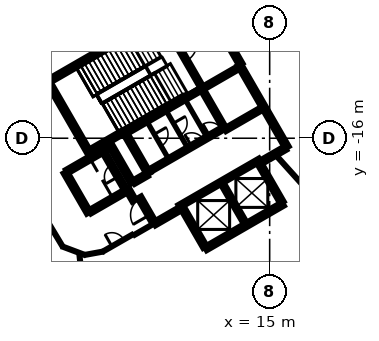
"""IFC4 building model, lengths in metres.
Left out: names, types, materials, properties, quantities, classifications, styles, units other than length and angle.
Written with IfcOpenShell. Run it as: python <this file> out.ifc"""

import sys

from ifc_helpers import new_model, si_unit, direction, frame, frame_2d, origin, place, context, subcontext, project, spatial, rectangle, extrude, element, fill, save


model = new_model("IFC4")
c1 = context("Model", 3, precision=1e-05, world=origin(), true_north=direction((0.0, 1.0)))
c2 = subcontext(c1, "Body", "Model", "MODEL_VIEW")
j1 = project(units=[si_unit("LENGTHUNIT", "METRE"), si_unit("PLANEANGLEUNIT", "RADIAN")], contexts=[c1])
p1 = place(None, origin())
s1 = spatial("IfcSite", under=j1, at=p1, CompositionType="ELEMENT")
p2 = place(p1, origin())
s2 = spatial("IfcBuilding", under=s1, at=p2, CompositionType="ELEMENT")
p3 = place(p2, origin())
s3 = spatial("IfcBuildingStorey", under=s2, at=p3, CompositionType="ELEMENT", Elevation=0.0)
p4 = place(p3, frame((0.417, -12.273, 0.0), z_axis=(0.0, 0.0, 1.0), x_axis=(0.866021906294, 0.500006057782, 0.0)))
e1 = element("IfcWall", 1, at=p4, inside=s3, PredefinedType="SHEAR", context=c2, shape_type="SweptSolid", body=[
    extrude(rectangle(XDim=11.55, YDim=0.25, at=frame_2d((5.775, 0.0))), origin(), (0.0, 0.0, 1.0), 7.1),
])
p5 = place(p4, frame((10.025, 0.0, 0.0)))
e2 = element("IfcOpeningElement", 2, at=p5, cuts=e1, PredefinedType="OPENING", context=c2, shape_type="SweptSolid", body=[
    extrude(rectangle(XDim=1.2, YDim=2.1, at=frame_2d((0.6, 1.05))), frame((0.0, 0.135, 0.0), z_axis=(0.0, -1.0, 0.0), x_axis=(1.0, 0.0, 0.0)), (0.0, 0.0, 1.0), 0.27),
])
p6 = place(p4, frame((8.725, 0.0, 0.0)))
e3 = element("IfcOpeningElement", 3, at=p6, cuts=e1, PredefinedType="OPENING", context=c2, shape_type="SweptSolid", body=[
    extrude(rectangle(XDim=1.2, YDim=2.1, at=frame_2d((0.6, 1.05))), frame((0.0, 0.135, 0.0), z_axis=(0.0, -1.0, 0.0), x_axis=(1.0, 0.0, 0.0)), (0.0, 0.0, 1.0), 0.27),
])
p7 = place(p3, frame((13.008, -11.181, 0.0), z_axis=(0.0, 0.0, 1.0), x_axis=(0.500004234368, -0.866022959057, 0.0)))
e4 = element("IfcWall", 4, at=p7, inside=s3, PredefinedType="SHEAR", context=c2, shape_type="SweptSolid", body=[
    extrude(rectangle(XDim=6.25, YDim=0.25, at=frame_2d((3.125, 0.0))), origin(), (0.0, 0.0, 1.0), 7.1),
])
p8 = place(p3, frame((15.865, -20.328, 0.0), z_axis=(0.0, 0.0, 1.0), x_axis=(-0.86602852612, -0.499994591916, 0.0)))
e5 = element("IfcWall", 5, at=p8, inside=s3, PredefinedType="SHEAR", context=c2, shape_type="SweptSolid", body=[
    extrude(rectangle(XDim=5.85, YDim=0.25, at=frame_2d((2.925, 0.0))), origin(), (0.0, 0.0, 1.0), 7.1),
])
p9 = place(p3, frame((3.235, -17.153, 0.0), z_axis=(0.0, 0.0, 1.0), x_axis=(-0.500008851346, 0.866020293397, 0.0)))
e6 = element("IfcWall", 6, at=p9, inside=s3, PredefinedType="SHEAR", context=c2, shape_type="SweptSolid", body=[
    extrude(rectangle(XDim=5.51, YDim=0.25, at=frame_2d((2.755, 0.0))), origin(), (0.0, 0.0, 1.0), 7.1),
])
p10 = place(p3, frame((10.483, -6.606, 0.0), z_axis=(0.0, 0.0, 1.0), x_axis=(0.49999885962, -0.866026062182, 0.0)))
e7 = element("IfcWall", 7, at=p10, inside=s3, PredefinedType="SHEAR", context=c2, shape_type="SweptSolid", body=[
    extrude(rectangle(XDim=5.225, YDim=0.25, at=frame_2d((2.612, 0.0))), origin(), (0.0, 0.0, 1.0), 7.1),
])
p11 = place(p3, frame((7.031, -18.327, 0.0), z_axis=(0.0, 0.0, 1.0), x_axis=(-0.499971222258, 0.866042017984, 0.0)))
e8 = element("IfcWall", 8, at=p11, inside=s3, PredefinedType="SHEAR", context=c2, shape_type="SweptSolid", body=[
    extrude(rectangle(XDim=3.2, YDim=0.25, at=frame_2d((1.6, 0.0))), origin(), (0.0, 0.0, 1.0), 7.1),
])
for number, where, z_axis, x_axis in (
    (9, (14.315, -17.644, 0.0), (0.0, 0.0, 1.0), (0.5, -0.866, 0.0)),
    (10, (10.736, -23.145, 0.0), (0.0, 0.0, 1.0), (-0.5, 0.866, 0.0)),
):
    element("IfcWall", number, at=place(p3, frame(where, z_axis=z_axis, x_axis=x_axis)), inside=s3, PredefinedType="SHEAR", context=c2, shape_type="SweptSolid", body=[
        extrude(rectangle(XDim=2.974, YDim=0.25, at=frame_2d((1.487, 0.0))), origin(), (0.0, 0.0, 1.0), 7.1),
    ])
p12 = place(p3, frame((3.085, -20.894, 0.0), z_axis=(0.0, 0.0, 1.0), x_axis=(-0.499978833458, 0.866037623948, 0.0)))
e11 = element("IfcWall", 11, at=p12, inside=s3, PredefinedType="SHEAR", context=c2, shape_type="SweptSolid", body=[
    extrude(rectangle(XDim=3.05, YDim=0.25, at=frame_2d((1.525, 0.0))), origin(), (0.0, 0.0, 1.0), 7.1),
])
p13 = place(p3, frame((1.669, -18.19, 0.0), z_axis=(0.0, 0.0, 1.0), x_axis=(0.866042235819, 0.499970844928, 0.0)))
e12 = element("IfcWall", 12, at=p13, inside=s3, PredefinedType="SHEAR", context=c2, shape_type="SweptSolid", body=[
    extrude(rectangle(XDim=2.865, YDim=0.25, at=frame_2d((1.432, 0.0))), origin(), (0.0, 0.0, 1.0), 7.1),
])
p14 = place(p3, frame((5.675, -19.399, 0.0), z_axis=(0.0, 0.0, 1.0), x_axis=(-0.866026637627, -0.499997862916, 0.0)))
e13 = element("IfcWall", 13, at=p14, inside=s3, PredefinedType="SHEAR", context=c2, shape_type="SweptSolid", body=[
    extrude(rectangle(XDim=2.865, YDim=0.25, at=frame_2d((1.432, 0.0))), origin(), (0.0, 0.0, 1.0), 7.1),
])
p15 = place(p3, frame((4.414, -16.276, 0.0), z_axis=(0.0, 0.0, 1.0), x_axis=(0.500003324108, -0.866023484601, 0.0)))
e14 = element("IfcWall", 14, at=p15, inside=s3, PredefinedType="SHEAR", context=c2, shape_type="SweptSolid", body=[
    extrude(rectangle(XDim=3.085, YDim=0.25, at=frame_2d((1.542, 0.0))), origin(), (0.0, 0.0, 1.0), 7.1),
])
p16 = place(p3, frame((5.322, -15.619, 0.0), z_axis=(0.0, 0.0, 1.0), x_axis=(-0.866026229868, -0.499998569178, 0.0)))
e15 = element("IfcWall", 15, at=p16, inside=s3, PredefinedType="SHEAR", context=c2, shape_type="SweptSolid", body=[
    extrude(rectangle(XDim=2.449, YDim=0.25, at=frame_2d((1.225, 0.0))), origin(), (0.0, 0.0, 1.0), 7.1),
])
p17 = place(p3, frame((9.14, -20.631, 0.0), z_axis=(0.0, 0.0, 1.0), x_axis=(-0.866043531843, -0.499968599967, 0.0)))
e16 = element("IfcWall", 16, at=p17, inside=s3, PredefinedType="SHEAR", context=c2, shape_type="SweptSolid", body=[
    extrude(rectangle(XDim=1.975, YDim=0.25, at=frame_2d((0.987, 0.0))), origin(), (0.0, 0.0, 1.0), 7.1),
])
p18 = place(p3, frame((16.025, -16.656, 0.0), z_axis=(0.0, 0.0, 1.0), x_axis=(-0.866016279763, -0.500015802937, 0.0)))
e17 = element("IfcWall", 17, at=p18, inside=s3, PredefinedType="SHEAR", context=c2, shape_type="SweptSolid", body=[
    extrude(rectangle(XDim=1.849, YDim=0.25, at=frame_2d((0.925, 0.0))), origin(), (0.0, 0.0, 1.0), 7.1),
])
p19 = place(p3, frame((7.367, -21.51, 0.0), z_axis=(0.0, 0.0, 1.0), x_axis=(-0.499983108224, 0.866035156036, 0.0)))
e18 = element("IfcWall", 18, at=p19, inside=s3, PredefinedType="SHEAR", context=c2, shape_type="SweptSolid", body=[
    extrude(rectangle(XDim=1.865, YDim=0.25, at=frame_2d((0.932, 0.0))), origin(), (0.0, 0.0, 1.0), 7.1),
])
p20 = place(p19, frame((0.535, 0.0, 0.0)))
e19 = element("IfcOpeningElement", 19, at=p20, cuts=e18, PredefinedType="OPENING", context=c2, shape_type="SweptSolid", body=[
    extrude(rectangle(XDim=1.25, YDim=2.1, at=frame_2d((0.625, 1.05))), frame((0.0, 0.135, 0.0), z_axis=(0.0, -1.0, 0.0), x_axis=(1.0, 0.0, 0.0)), (0.0, 0.0, 1.0), 0.27),
])
p21 = place(p3, frame((6.065, -18.885, 0.0), z_axis=(0.0, 0.0, 1.0), x_axis=(0.866017078145, 0.500014420154, 0.0)))
e20 = element("IfcWall", 20, at=p21, inside=s3, PredefinedType="SHEAR", context=c2, shape_type="SweptSolid", body=[
    extrude(rectangle(XDim=0.989, YDim=0.25, at=frame_2d((0.495, 0.0))), origin(), (0.0, 0.0, 1.0), 7.1),
])
p22 = place(p3, frame((6.08, -20.1, 0.0), z_axis=(0.0, 0.0, 1.0), x_axis=(-0.500051773299, 0.865995510393, 0.0)))
e21 = element("IfcWall", 21, at=p22, inside=s3, PredefinedType="SHEAR", context=c2, shape_type="SweptSolid", body=[
    extrude(rectangle(XDim=0.685, YDim=0.25, at=frame_2d((0.342, 0.0))), origin(), (0.0, 0.0, 1.0), 7.1),
])
p23 = place(p3, frame((4.145, -16.749, 0.0), z_axis=(0.0, 0.0, 1.0), x_axis=(0.866185586049, 0.49972245349, 0.0)))
e22 = element("IfcWall", 22, at=p23, inside=s3, PredefinedType="SHEAR", context=c2, shape_type="SweptSolid", body=[
    extrude(rectangle(XDim=0.344, YDim=0.25, at=frame_2d((0.172, 0.0))), origin(), (0.0, 0.0, 1.0), 7.1),
])
p24 = place(p3, frame((9.052, -20.48, 0.0), z_axis=(0.0, 0.0, 1.0), x_axis=(0.866030299012, 0.499991521122, 0.0)))
e23 = element("IfcWall", 23, at=p24, inside=s3, PredefinedType="SHEAR", context=c2, shape_type="SweptSolid", body=[
    extrude(rectangle(XDim=6.1, YDim=0.2, at=frame_2d((3.05, 0.0))), origin(), (0.0, 0.0, 1.0), 7.1),
])
p25 = place(p24, frame((1.0, 0.0, 0.0)))
e24 = element("IfcOpeningElement", 24, at=p25, cuts=e23, PredefinedType="OPENING", context=c2, shape_type="SweptSolid", body=[
    extrude(rectangle(XDim=1.2, YDim=2.1, at=frame_2d((0.6, 1.05))), frame((0.0, 0.11, 0.0), z_axis=(0.0, -1.0, 0.0), x_axis=(1.0, 0.0, 0.0)), (0.0, 0.0, 1.0), 0.22),
])
p26 = place(p24, frame((4.05, 0.0, 0.0)))
e25 = element("IfcOpeningElement", 25, at=p26, cuts=e23, PredefinedType="OPENING", context=c2, shape_type="SweptSolid", body=[
    extrude(rectangle(XDim=1.2, YDim=2.1, at=frame_2d((0.6, 1.05))), frame((0.0, 0.11, 0.0), z_axis=(0.0, -1.0, 0.0), x_axis=(1.0, 0.0, 0.0)), (0.0, 0.0, 1.0), 0.22),
])
p27 = place(p3, frame((10.538, -12.752, 0.0), z_axis=(0.0, 0.0, 1.0), x_axis=(-0.866038630372, -0.499977090179, 0.0)))
e26 = element("IfcWall", 26, at=p27, inside=s3, PredefinedType="SHEAR", context=c2, shape_type="SweptSolid", body=[
    extrude(rectangle(XDim=5.699, YDim=0.2, at=frame_2d((2.85, 0.0))), origin(), (0.0, 0.0, 1.0), 7.1),
])
p28 = place(p3, frame((7.077, -18.156, 0.0), z_axis=(0.0, 0.0, 1.0), x_axis=(0.866038630372, 0.499977090179, 0.0)))
e27 = element("IfcWall", 27, at=p28, inside=s3, PredefinedType="SHEAR", context=c2, shape_type="SweptSolid", body=[
    extrude(rectangle(XDim=5.699, YDim=0.2, at=frame_2d((2.85, 0.0))), origin(), (0.0, 0.0, 1.0), 7.1),
])
p29 = place(p28, frame((3.224, 0.0, 0.0)))
e28 = element("IfcOpeningElement", 28, at=p29, cuts=e27, PredefinedType="OPENING", context=c2, shape_type="SweptSolid", body=[
    extrude(rectangle(XDim=0.9, YDim=2.1, at=frame_2d((0.45, 1.05))), frame((0.0, 0.11, 0.0), z_axis=(0.0, -1.0, 0.0), x_axis=(1.0, 0.0, 0.0)), (0.0, 0.0, 1.0), 0.22),
])
p30 = place(p28, frame((4.599, 0.0, 0.0)))
e29 = element("IfcOpeningElement", 29, at=p30, cuts=e27, PredefinedType="OPENING", context=c2, shape_type="SweptSolid", body=[
    extrude(rectangle(XDim=0.9, YDim=2.1, at=frame_2d((0.45, 1.05))), frame((0.0, 0.11, 0.0), z_axis=(0.0, -1.0, 0.0), x_axis=(1.0, 0.0, 0.0)), (0.0, 0.0, 1.0), 0.22),
])
p31 = place(p3, frame((7.906, -8.094, 0.0), z_axis=(0.0, 0.0, 1.0), x_axis=(0.500024287448, -0.866011380966, 0.0)))
e30 = element("IfcWall", 30, at=p31, inside=s3, PredefinedType="SHEAR", context=c2, shape_type="SweptSolid", body=[
    extrude(rectangle(XDim=5.251, YDim=0.2, at=frame_2d((2.625, 0.0))), origin(), (0.0, 0.0, 1.0), 7.1),
])
p32 = place(p31, frame((1.849, 0.0, 0.0)))
e31 = element("IfcOpeningElement", 31, at=p32, cuts=e30, PredefinedType="OPENING", context=c2, shape_type="SweptSolid", body=[
    extrude(rectangle(XDim=1.4, YDim=2.1, at=frame_2d((0.7, 1.05))), frame((0.0, 0.11, 0.0), z_axis=(0.0, -1.0, 0.0), x_axis=(1.0, 0.0, 0.0)), (0.0, 0.0, 1.0), 0.22),
])
p33 = place(p3, frame((11.875, -18.967, 0.0), z_axis=(0.0, 0.0, 1.0), x_axis=(0.49998131003, -0.866036194175, 0.0)))
e32 = element("IfcWall", 32, at=p33, inside=s3, PredefinedType="SHEAR", context=c2, shape_type="SweptSolid", body=[
    extrude(rectangle(XDim=3.048, YDim=0.2, at=frame_2d((1.524, 0.0))), origin(), (0.0, 0.0, 1.0), 7.1),
])
p34 = place(p3, frame((5.503, -19.352, 0.0), z_axis=(0.0, 0.0, 1.0), x_axis=(-0.499986818241, 0.866033014143, 0.0)))
e33 = element("IfcWall", 33, at=p34, inside=s3, PredefinedType="SHEAR", context=c2, shape_type="SweptSolid", body=[
    extrude(rectangle(XDim=2.798, YDim=0.2, at=frame_2d((1.399, 0.0))), origin(), (0.0, 0.0, 1.0), 7.1),
])
p35 = place(p34, frame((0.949, 0.0, 0.0)))
e34 = element("IfcOpeningElement", 34, at=p35, cuts=e33, PredefinedType="OPENING", context=c2, shape_type="SweptSolid", body=[
    extrude(rectangle(XDim=0.9, YDim=2.1, at=frame_2d((0.45, 1.05))), frame((0.0, 0.11, 0.0), z_axis=(0.0, -1.0, 0.0), x_axis=(1.0, 0.0, 0.0)), (0.0, 0.0, 1.0), 0.22),
])
p36 = place(p3, frame((11.963, -15.22, 0.0), z_axis=(0.0, 0.0, 1.0), x_axis=(-0.500034990121, 0.866005201286, 0.0)))
e35 = element("IfcWall", 35, at=p36, inside=s3, PredefinedType="SHEAR", context=c2, shape_type="SweptSolid", body=[
    extrude(rectangle(XDim=2.75, YDim=0.2, at=frame_2d((1.375, 0.0))), origin(), (0.0, 0.0, 1.0), 7.1),
])
p37 = place(p3, frame((10.587, -12.723, 0.0), z_axis=(0.0, 0.0, 1.0), x_axis=(0.866037306777, 0.499979382845, 0.0)))
e36 = element("IfcWall", 36, at=p37, inside=s3, PredefinedType="SHEAR", context=c2, shape_type="SweptSolid", body=[
    extrude(rectangle(XDim=2.742, YDim=0.2, at=frame_2d((1.371, 0.0))), origin(), (0.0, 0.0, 1.0), 7.1),
])
p38 = place(p37, frame((0.743, 0.0, 0.0)))
e37 = element("IfcOpeningElement", 37, at=p38, cuts=e36, PredefinedType="OPENING", context=c2, shape_type="SweptSolid", body=[
    extrude(rectangle(XDim=1.3, YDim=2.1, at=frame_2d((0.65, 1.05))), frame((0.0, 0.11, 0.0), z_axis=(0.0, -1.0, 0.0), x_axis=(1.0, 0.0, 0.0)), (0.0, 0.0, 1.0), 0.22),
])
p39 = place(p3, frame((14.512, -14.037, 0.0), z_axis=(0.0, 0.0, 1.0), x_axis=(-0.866044696403, -0.499966582715, 0.0)))
e38 = element("IfcWall", 38, at=p39, inside=s3, PredefinedType="SHEAR", context=c2, shape_type="SweptSolid", body=[
    extrude(rectangle(XDim=2.799, YDim=0.2, at=frame_2d((1.399, 0.0))), origin(), (0.0, 0.0, 1.0), 7.1),
])
p40 = place(p3, frame((8.207, -14.214, 0.0), z_axis=(0.0, 0.0, 1.0), x_axis=(0.50002746344, -0.86600954718, 0.0)))
e39 = element("IfcWall", 39, at=p40, inside=s3, PredefinedType="PARTITIONING", context=c2, shape_type="SweptSolid", body=[
    extrude(rectangle(XDim=2.748, YDim=0.15, at=frame_2d((1.374, 0.0))), origin(), (0.0, 0.0, 1.0), 7.1),
])
p41 = place(p40, frame((0.924, 0.0, 0.0)))
e40 = element("IfcOpeningElement", 40, at=p41, cuts=e39, PredefinedType="OPENING", context=c2, shape_type="SweptSolid", body=[
    extrude(rectangle(XDim=0.9, YDim=2.1, at=frame_2d((0.45, 1.05))), frame((0.0, 0.085, 0.0), z_axis=(0.0, -1.0, 0.0), x_axis=(1.0, 0.0, 0.0)), (0.0, 0.0, 1.0), 0.17),
])
p42 = place(p3, frame((9.462, -13.489, 0.0), z_axis=(0.0, 0.0, 1.0), x_axis=(0.499988999718, -0.866031754707, 0.0)))
e41 = element("IfcWall", 41, at=p42, inside=s3, PredefinedType="PARTITIONING", context=c2, shape_type="SweptSolid", body=[
    extrude(rectangle(XDim=2.749, YDim=0.15, at=frame_2d((1.374, 0.0))), origin(), (0.0, 0.0, 1.0), 7.1),
])
p43 = place(p3, frame((6.951, -14.939, 0.0), z_axis=(0.0, 0.0, 1.0), x_axis=(0.499988999718, -0.866031754707, 0.0)))
e42 = element("IfcWall", 42, at=p43, inside=s3, PredefinedType="PARTITIONING", context=c2, shape_type="SweptSolid", body=[
    extrude(rectangle(XDim=2.749, YDim=0.15, at=frame_2d((1.374, 0.0))), origin(), (0.0, 0.0, 1.0), 7.1),
])
p44 = place(p43, frame((0.924, 0.0, 0.0)))
e43 = element("IfcOpeningElement", 43, at=p44, cuts=e42, PredefinedType="OPENING", context=c2, shape_type="SweptSolid", body=[
    extrude(rectangle(XDim=0.9, YDim=2.1, at=frame_2d((0.45, 1.05))), frame((0.0, 0.085, 0.0), z_axis=(0.0, -1.0, 0.0), x_axis=(1.0, 0.0, 0.0)), (0.0, 0.0, 1.0), 0.17),
])
p45 = place(p3, frame((10.617, -6.426, 0.0), z_axis=(0.0, 0.0, 1.0), x_axis=(0.957017605076, -0.290029832216, 0.0)))
e44 = element("IfcWall", 44, at=p45, inside=s3, PredefinedType="PARTITIONING", context=c2, shape_type="SweptSolid", body=[
    extrude(rectangle(XDim=15.402, YDim=0.2, at=frame_2d((7.701, 0.0))), origin(), (0.0, 0.0, 1.0), 4.7),
])
p46 = place(p3, frame((-1.046, -19.087, 0.0), z_axis=(0.0, 0.0, 1.0), x_axis=(0.515112605672, -0.857122513692, 0.0)))
e45 = element("IfcWall", 45, at=p46, inside=s3, PredefinedType="PARTITIONING", context=c2, shape_type="SweptSolid", body=[
    extrude(rectangle(XDim=4.713, YDim=0.2, at=frame_2d((2.357, 0.0))), origin(), (0.0, 0.0, 1.0), 7.1),
])
p47 = place(p3, frame((1.391, -23.133, 0.0), z_axis=(0.0, 0.0, 1.0), x_axis=(0.936212023637, -0.351435693688, 0.0)))
e46 = element("IfcWall", 46, at=p47, inside=s3, PredefinedType="PARTITIONING", context=c2, shape_type="SweptSolid", body=[
    extrude(rectangle(XDim=1.542, YDim=0.2, at=frame_2d((0.771, 0.0))), origin(), (0.0, 0.0, 1.0), 7.1),
])
p48 = place(p3, frame((2.474, -23.543, 0.0), z_axis=(0.0, 0.0, 1.0), x_axis=(0.10461532009, -0.994512762514, 0.0)))
e47 = element("IfcWall", 47, at=p48, inside=s3, PredefinedType="PARTITIONING", context=c2, shape_type="SweptSolid", body=[
    extrude(rectangle(XDim=9.697, YDim=0.2, at=frame_2d((4.848, 0.0))), origin(), (0.0, 0.0, 1.0), 4.7),
])
p49 = place(p3, frame((2.838, -23.675, 0.0), z_axis=(0.0, 0.0, 1.0), x_axis=(0.983748481543, 0.179552012136, 0.0)))
e48 = element("IfcWall", 48, at=p49, inside=s3, PredefinedType="PARTITIONING", context=c2, shape_type="SweptSolid", body=[
    extrude(rectangle(XDim=1.192, YDim=0.2, at=frame_2d((0.596, 0.0))), origin(), (0.0, 0.0, 1.0), 7.1),
])
p50 = place(p3, frame((4.022, -23.458, 0.0), z_axis=(0.0, 0.0, 1.0), x_axis=(0.867379634497, 0.497647033208, 0.0)))
e49 = element("IfcWall", 49, at=p50, inside=s3, PredefinedType="PARTITIONING", context=c2, shape_type="SweptSolid", body=[
    extrude(rectangle(XDim=2.283, YDim=0.2, at=frame_2d((1.141, 0.0))), origin(), (0.0, 0.0, 1.0), 7.1),
])
p51 = place(p50, frame((0.691, 0.0, 0.0)))
e50 = element("IfcOpeningElement", 50, at=p51, cuts=e49, PredefinedType="OPENING", context=c2, shape_type="SweptSolid", body=[
    extrude(rectangle(XDim=0.9, YDim=2.1, at=frame_2d((0.45, 1.05))), frame((0.0, 0.11, 0.0), z_axis=(0.0, -1.0, 0.0), x_axis=(1.0, 0.0, 0.0)), (0.0, 0.0, 1.0), 0.22),
])
p52 = place(p3, frame((6.059, -22.383, 0.0), z_axis=(0.0, 0.0, 1.0), x_axis=(0.866009351323, 0.500027802648, 0.0)))
e51 = element("IfcWall", 51, at=p52, inside=s3, PredefinedType="PARTITIONING", context=c2, shape_type="SweptSolid", body=[
    extrude(rectangle(XDim=1.384, YDim=0.2, at=frame_2d((0.692, 0.0))), origin(), (0.0, 0.0, 1.0), 7.1),
])
p53 = place(p3, frame((15.475, -17.188, 0.0), z_axis=(0.0, 0.0, 1.0), x_axis=(0.669166821611, -0.74311221552, 0.0)))
e52 = element("IfcWall", 52, at=p53, inside=s3, PredefinedType="PARTITIONING", context=c2, shape_type="SweptSolid", body=[
    extrude(rectangle(XDim=17.218, YDim=0.2, at=frame_2d((8.609, 0.0))), origin(), (0.0, 0.0, 1.0), 4.7),
])
p54 = place(p53, frame((8.006, 0.0, 0.0)))
e53 = element("IfcOpeningElement", 53, at=p54, cuts=e52, PredefinedType="OPENING", context=c2, shape_type="SweptSolid", body=[
    extrude(rectangle(XDim=1.0, YDim=2.1, at=frame_2d((0.5, 1.05))), frame((0.0, 0.11, 0.0), z_axis=(0.0, -1.0, 0.0), x_axis=(1.0, 0.0, 0.0)), (0.0, 0.0, 1.0), 0.22),
])
p55 = place(p38, origin())
e54 = element("IfcDoor", 54, at=p55, inside=s3, OperationType="SLIDING_TO_RIGHT", PredefinedType="DOOR", context=c2, shape_type="SweptSolid", body=[
    extrude(rectangle(XDim=1.3, YDim=2.1, at=frame_2d((0.65, 1.05))), frame((0.0, 0.025, 0.0), z_axis=(0.0, -1.0, 0.0), x_axis=(1.0, 0.0, 0.0)), (0.0, 0.0, 1.0), 0.05),
])
fill(e37, e54)
p56 = place(p25, origin())
e55 = element("IfcDoor", 55, at=p56, inside=s3, OperationType="DOUBLE_DOOR_SLIDING", PredefinedType="DOOR", context=c2, shape_type="SweptSolid", body=[
    extrude(rectangle(XDim=1.2, YDim=2.1, at=frame_2d((0.6, 1.05))), frame((0.0, 0.025, 0.0), z_axis=(0.0, -1.0, 0.0), x_axis=(1.0, 0.0, 0.0)), (0.0, 0.0, 1.0), 0.05),
])
fill(e24, e55)
p57 = place(p26, origin())
e56 = element("IfcDoor", 56, at=p57, inside=s3, OperationType="DOUBLE_DOOR_SLIDING", PredefinedType="DOOR", context=c2, shape_type="SweptSolid", body=[
    extrude(rectangle(XDim=1.2, YDim=2.1, at=frame_2d((0.6, 1.05))), frame((0.0, 0.025, 0.0), z_axis=(0.0, -1.0, 0.0), x_axis=(1.0, 0.0, 0.0)), (0.0, 0.0, 1.0), 0.05),
])
fill(e25, e56)
p58 = place(p20, origin())
e57 = element("IfcDoor", 57, at=p58, inside=s3, OperationType="SINGLE_SWING_LEFT", PredefinedType="DOOR", context=c2, shape_type="SweptSolid", body=[
    extrude(rectangle(XDim=1.25, YDim=2.1, at=frame_2d((0.625, 1.05))), frame((0.0, 0.025, 0.0), z_axis=(0.0, -1.0, 0.0), x_axis=(1.0, 0.0, 0.0)), (0.0, 0.0, 1.0), 0.05),
])
fill(e19, e57)
p59 = place(p32, origin())
e58 = element("IfcDoor", 58, at=p59, inside=s3, OperationType="SINGLE_SWING_RIGHT", PredefinedType="DOOR", context=c2, shape_type="SweptSolid", body=[
    extrude(rectangle(XDim=1.4, YDim=2.1, at=frame_2d((0.7, 1.05))), frame((0.0, 0.025, 0.0), z_axis=(0.0, -1.0, 0.0), x_axis=(1.0, 0.0, 0.0)), (0.0, 0.0, 1.0), 0.05),
])
fill(e31, e58)
p60 = place(p29, origin())
e59 = element("IfcDoor", 59, at=p60, inside=s3, OperationType="SINGLE_SWING_LEFT", PredefinedType="DOOR", context=c2, shape_type="SweptSolid", body=[
    extrude(rectangle(XDim=0.9, YDim=2.1, at=frame_2d((0.45, 1.05))), frame((0.0, 0.025, 0.0), z_axis=(0.0, -1.0, 0.0), x_axis=(1.0, 0.0, 0.0)), (0.0, 0.0, 1.0), 0.05),
])
fill(e28, e59)
p61 = place(p30, origin())
e60 = element("IfcDoor", 60, at=p61, inside=s3, OperationType="SINGLE_SWING_RIGHT", PredefinedType="DOOR", context=c2, shape_type="SweptSolid", body=[
    extrude(rectangle(XDim=0.9, YDim=2.1, at=frame_2d((0.45, 1.05))), frame((0.0, 0.025, 0.0), z_axis=(0.0, -1.0, 0.0), x_axis=(1.0, 0.0, 0.0)), (0.0, 0.0, 1.0), 0.05),
])
fill(e29, e60)
p62 = place(p35, origin())
e61 = element("IfcDoor", 61, at=p62, inside=s3, OperationType="SINGLE_SWING_LEFT", PredefinedType="DOOR", context=c2, shape_type="SweptSolid", body=[
    extrude(rectangle(XDim=0.9, YDim=2.1, at=frame_2d((0.45, 1.05))), frame((0.0, 0.025, 0.0), z_axis=(0.0, -1.0, 0.0), x_axis=(1.0, 0.0, 0.0)), (0.0, 0.0, 1.0), 0.05),
])
fill(e34, e61)
p63 = place(p41, origin())
e62 = element("IfcDoor", 62, at=p63, inside=s3, OperationType="SINGLE_SWING_RIGHT", PredefinedType="DOOR", context=c2, shape_type="SweptSolid", body=[
    extrude(rectangle(XDim=0.9, YDim=2.1, at=frame_2d((0.45, 1.05))), frame((0.0, 0.025, 0.0), z_axis=(0.0, -1.0, 0.0), x_axis=(1.0, 0.0, 0.0)), (0.0, 0.0, 1.0), 0.05),
])
fill(e40, e62)
p64 = place(p44, origin())
e63 = element("IfcDoor", 63, at=p64, inside=s3, OperationType="SINGLE_SWING_LEFT", PredefinedType="DOOR", context=c2, shape_type="SweptSolid", body=[
    extrude(rectangle(XDim=0.9, YDim=2.1, at=frame_2d((0.45, 1.05))), frame((0.0, 0.025, 0.0), z_axis=(0.0, -1.0, 0.0), x_axis=(1.0, 0.0, 0.0)), (0.0, 0.0, 1.0), 0.05),
])
fill(e43, e63)
p65 = place(p51, frame((0.9, 0.0, 0.0), z_axis=(0.0, 0.0, 1.0), x_axis=(-1.0, 0.0, 0.0)))
e64 = element("IfcDoor", 64, at=p65, inside=s3, OperationType="SINGLE_SWING_LEFT", PredefinedType="DOOR", context=c2, shape_type="SweptSolid", body=[
    extrude(rectangle(XDim=0.9, YDim=2.1, at=frame_2d((0.45, 1.05))), frame((0.0, 0.025, 0.0), z_axis=(0.0, -1.0, 0.0), x_axis=(1.0, 0.0, 0.0)), (0.0, 0.0, 1.0), 0.05),
])
fill(e50, e64)
save(model, sys.argv[1])
